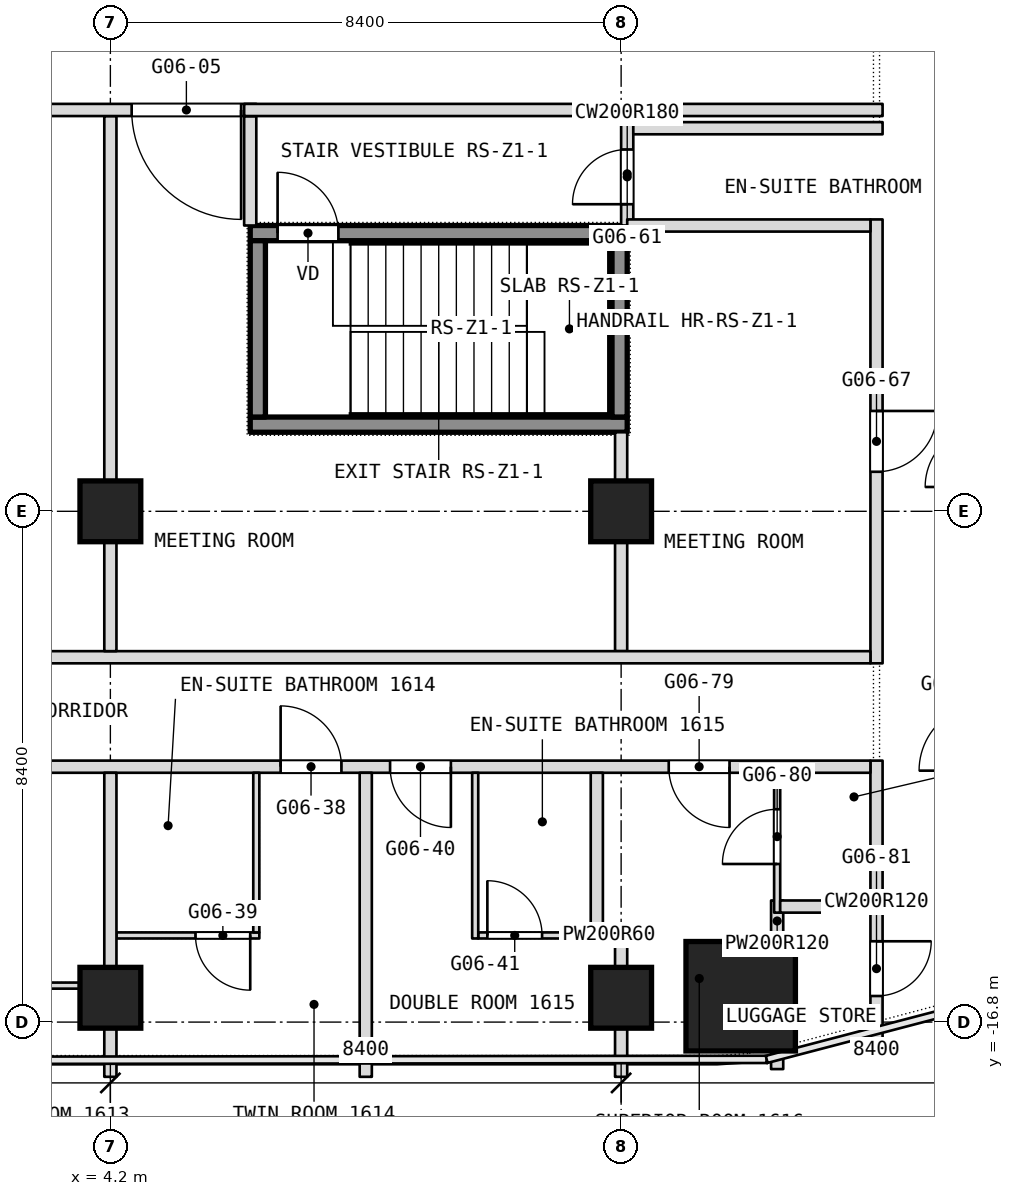
"""IFC4 building model, lengths in metres.
Left out: names, types, materials, properties, quantities, classifications, styles, units other than length and angle.
Written with IfcOpenShell. Run it as: python <this file> out.ifc"""

import sys

from ifc_helpers import new_model, si_unit, direction, frame, frame_2d, origin, origin_2d, place, context, subcontext, project, spatial, rectangle, extrude, element, fill, save


model = new_model("IFC4")
c1 = context("Model", 3, precision=1e-05, world=origin(), true_north=direction((0.0, 1.0)))
c2 = subcontext(c1, "Body", "Model", "MODEL_VIEW")
j1 = project(units=[si_unit("LENGTHUNIT", "METRE"), si_unit("PLANEANGLEUNIT", "RADIAN")], contexts=[c1])
p1 = place(None, origin())
s1 = spatial("IfcSite", under=j1, at=p1, CompositionType="ELEMENT")
p2 = place(p1, origin())
s2 = spatial("IfcBuilding", under=s1, at=p2, CompositionType="ELEMENT")
p3 = place(p2, frame((0.0, 0.0, 72.5)))
s3 = spatial("IfcBuildingStorey", under=s2, at=p3, CompositionType="ELEMENT", Elevation=72.5)
p4 = place(p3, frame((14.566, -16.375, 0.0), z_axis=(0.0, 0.0, 1.0), x_axis=(1.0, 0.0, 0.0)))
e1 = element("IfcColumn", 1, at=p4, inside=s3, PredefinedType="COLUMN", context=c2, shape_type="SweptSolid", body=[
    extrude(rectangle(XDim=1.8, YDim=1.8, at=origin_2d()), origin(), (0.0, 0.0, 1.0), 3.6),
])
for number, where, z_axis, x_axis in (
    (2, (4.2, -8.4, 0.0), (0.0, 0.0, 1.0), (1.0, 0.0, 0.0)),
    (3, (12.6, -8.4, 0.0), (0.0, 0.0, 1.0), (1.0, 0.0, 0.0)),
    (4, (12.6, -16.4, 0.0), (0.0, 0.0, 1.0), (1.0, 0.0, 0.0)),
    (5, (4.2, -16.4, 0.0), (0.0, 0.0, 1.0), (1.0, 0.0, 0.0)),
):
    element("IfcColumn", number, at=place(p3, frame(where, z_axis=z_axis, x_axis=x_axis)), inside=s3, PredefinedType="COLUMN", context=c2, shape_type="SweptSolid", body=[
        extrude(rectangle(XDim=1.0, YDim=1.0, at=origin_2d()), origin(), (0.0, 0.0, 1.0), 3.6),
    ])
p5 = place(p3, frame((16.8, -17.143, 0.0), z_axis=(0.0, 0.0, 1.0), x_axis=(0.0, 1.0, 0.0)))
e6 = element("IfcWall", 6, at=p5, inside=s3, PredefinedType="PARTITIONING", context=c2, shape_type="SweptSolid", body=[
    extrude(rectangle(XDim=4.643, YDim=0.2, at=frame_2d((2.322, 0.0))), origin(), (0.0, 0.0, 1.0), 3.34),
])
p6 = place(p5, frame((0.772, 0.0, 0.0)))
e7 = element("IfcOpeningElement", 7, at=p6, cuts=e6, PredefinedType="OPENING", context=c2, shape_type="SweptSolid", body=[
    extrude(rectangle(XDim=0.9, YDim=2.1, at=frame_2d((0.45, 1.05))), frame((0.0, 0.1, 0.0), z_axis=(0.0, -1.0, 0.0), x_axis=(1.0, 0.0, 0.0)), (0.0, 0.0, 1.0), 0.2),
])
p7 = place(p3, frame((16.8, -10.9, 0.0), z_axis=(0.0, 0.0, 1.0), x_axis=(0.0, 1.0, 0.0)))
e8 = element("IfcWall", 8, at=p7, inside=s3, PredefinedType="PARTITIONING", context=c2, shape_type="SweptSolid", body=[
    extrude(rectangle(XDim=7.3, YDim=0.2, at=frame_2d((3.65, 0.0))), origin(), (0.0, 0.0, 1.0), 3.34),
])
p8 = place(p7, frame((3.15, 0.0, 0.0)))
e9 = element("IfcOpeningElement", 9, at=p8, cuts=e8, PredefinedType="OPENING", context=c2, shape_type="SweptSolid", body=[
    extrude(rectangle(XDim=1.0, YDim=2.1, at=frame_2d((0.5, 1.05))), frame((0.0, 0.1, 0.0), z_axis=(0.0, -1.0, 0.0), x_axis=(1.0, 0.0, 0.0)), (0.0, 0.0, 1.0), 0.2),
])
p9 = place(p3, frame((0.65, -16.2, 0.0), z_axis=(0.0, 0.0, 1.0), x_axis=(1.0, 0.0, 0.0)))
e10 = element("IfcWall", 10, at=p9, inside=s3, PredefinedType="PARTITIONING", context=c2, shape_type="SweptSolid", body=[
    extrude(rectangle(XDim=3.65, YDim=0.1, at=frame_2d((1.825, 0.0))), origin(), (0.0, 0.0, 1.0), 2.94),
])
p10 = place(p9, frame((0.15, 0.0, 0.0)))
e11 = element("IfcOpeningElement", 11, at=p10, cuts=e10, PredefinedType="OPENING", context=c2, shape_type="SweptSolid", body=[
    extrude(rectangle(XDim=0.9, YDim=2.1, at=frame_2d((0.45, 1.05))), frame((0.0, 0.05, 0.0), z_axis=(0.0, -1.0, 0.0), x_axis=(1.0, 0.0, 0.0)), (0.0, 0.0, 1.0), 0.1),
])
p11 = place(p3, frame((4.3, -15.375, 0.0), z_axis=(0.0, 0.0, 1.0), x_axis=(1.0, 0.0, 0.0)))
e12 = element("IfcWall", 12, at=p11, inside=s3, PredefinedType="PARTITIONING", context=c2, shape_type="SweptSolid", body=[
    extrude(rectangle(XDim=2.35, YDim=0.1, at=frame_2d((1.175, 0.0))), origin(), (0.0, 0.0, 1.0), 3.34),
])
p12 = place(p11, frame((1.3, 0.0, 0.0)))
e13 = element("IfcOpeningElement", 13, at=p12, cuts=e12, PredefinedType="OPENING", context=c2, shape_type="SweptSolid", body=[
    extrude(rectangle(XDim=0.9, YDim=2.1, at=frame_2d((0.45, 1.05))), frame((0.0, 0.05, 0.0), z_axis=(0.0, -1.0, 0.0), x_axis=(1.0, 0.0, 0.0)), (0.0, 0.0, 1.0), 0.1),
])
p13 = place(p3, frame((10.25, -15.375, 0.0), z_axis=(0.0, 0.0, 1.0), x_axis=(1.0, 0.0, 0.0)))
e14 = element("IfcWall", 14, at=p13, inside=s3, PredefinedType="PARTITIONING", context=c2, shape_type="SweptSolid", body=[
    extrude(rectangle(XDim=2.05, YDim=0.1, at=frame_2d((1.025, 0.0))), origin(), (0.0, 0.0, 1.0), 3.34),
])
p14 = place(p13, frame((0.15, 0.0, 0.0)))
e15 = element("IfcOpeningElement", 15, at=p14, cuts=e14, PredefinedType="OPENING", context=c2, shape_type="SweptSolid", body=[
    extrude(rectangle(XDim=0.9, YDim=2.1, at=frame_2d((0.45, 1.05))), frame((0.0, 0.05, 0.0), z_axis=(0.0, -1.0, 0.0), x_axis=(1.0, 0.0, 0.0)), (0.0, 0.0, 1.0), 0.1),
])
p15 = place(p3, frame((12.1, -15.375, 0.0), z_axis=(0.0, 0.0, 1.0), x_axis=(1.0, 0.0, 0.0)))
e16 = element("IfcWall", 16, at=p15, inside=s3, PredefinedType="PARTITIONING", context=c2, shape_type="SweptSolid", body=[
    extrude(rectangle(XDim=0.6, YDim=0.2, at=frame_2d((0.3, 0.0))), origin(), (0.0, 0.0, 1.0), 3.34),
])
p16 = place(p3, frame((15.166, -17.573, 0.0), z_axis=(0.0, 0.0, 1.0), x_axis=(0.0, 1.0, 0.0)))
e17 = element("IfcWall", 17, at=p16, inside=s3, PredefinedType="PARTITIONING", context=c2, shape_type="SweptSolid", body=[
    extrude(rectangle(XDim=0.298, YDim=0.2, at=frame_2d((0.149, 0.0))), origin(), (0.0, 0.0, 1.0), 3.34),
])
p17 = place(p3, frame((15.166, -15.475, 0.0), z_axis=(0.0, 0.0, 1.0), x_axis=(0.0, 1.0, 0.0)))
e18 = element("IfcWall", 18, at=p17, inside=s3, PredefinedType="PARTITIONING", context=c2, shape_type="SweptSolid", body=[
    extrude(rectangle(XDim=0.675, YDim=0.2, at=frame_2d((0.337, 0.0))), origin(), (0.0, 0.0, 1.0), 3.34),
])
p18 = place(p3, frame((15.166, -15.0, 0.0), z_axis=(0.0, 0.0, 1.0), x_axis=(0.0, 1.0, 0.0)))
e19 = element("IfcWall", 19, at=p18, inside=s3, PredefinedType="PARTITIONING", context=c2, shape_type="SweptSolid", body=[
    extrude(rectangle(XDim=2.3, YDim=0.1, at=frame_2d((1.15, 0.0))), origin(), (0.0, 0.0, 1.0), 3.34),
])
p19 = place(p18, frame((0.8, 0.0, 0.0)))
e20 = element("IfcOpeningElement", 20, at=p19, cuts=e19, PredefinedType="OPENING", context=c2, shape_type="SweptSolid", body=[
    extrude(rectangle(XDim=0.9, YDim=2.1, at=frame_2d((0.45, 1.05))), frame((0.0, 0.05, 0.0), z_axis=(0.0, -1.0, 0.0), x_axis=(1.0, 0.0, 0.0)), (0.0, 0.0, 1.0), 0.1),
])
p20 = place(p3, frame((15.216, -14.9, 0.0), z_axis=(0.0, 0.0, 1.0), x_axis=(1.0, 0.0, 0.0)))
e21 = element("IfcWall", 21, at=p20, inside=s3, PredefinedType="PARTITIONING", context=c2, shape_type="SweptSolid", body=[
    extrude(rectangle(XDim=1.484, YDim=0.2, at=frame_2d((0.742, 0.0))), origin(), (0.0, 0.0, 1.0), 3.34),
])
p21 = place(p3, frame((12.7, -3.7, 0.0), z_axis=(0.0, 0.0, 1.0), x_axis=(0.0, 1.0, 0.0)))
e22 = element("IfcWall", 22, at=p21, inside=s3, PredefinedType="PARTITIONING", context=c2, shape_type="SweptSolid", body=[
    extrude(rectangle(XDim=1.7, YDim=0.2, at=frame_2d((0.85, 0.0))), origin(), (0.0, 0.0, 1.0), 3.34),
])
p22 = place(p21, frame((0.35, 0.0, 0.0)))
e23 = element("IfcOpeningElement", 23, at=p22, cuts=e22, PredefinedType="OPENING", context=c2, shape_type="SweptSolid", body=[
    extrude(rectangle(XDim=0.9, YDim=2.1, at=frame_2d((0.45, 1.05))), frame((0.0, 0.1, 0.0), z_axis=(0.0, -1.0, 0.0), x_axis=(1.0, 0.0, 0.0)), (0.0, 0.0, 1.0), 0.2),
])
p23 = place(p3, frame((12.6, -17.7, 0.0), z_axis=(0.0, 0.0, 1.0), x_axis=(0.0, 1.0, 0.0)))
e24 = element("IfcWall", 24, at=p23, inside=s3, PredefinedType="PARTITIONING", context=c2, shape_type="SweptSolid", body=[
    extrude(rectangle(XDim=2.225, YDim=0.2, at=frame_2d((1.112, 0.0))), origin(), (0.0, 0.0, 1.0), 3.34),
])
p24 = place(p3, frame((12.6, -10.7, 0.0), z_axis=(0.0, 0.0, 1.0), x_axis=(0.0, 1.0, 0.0)))
e25 = element("IfcWall", 25, at=p24, inside=s3, PredefinedType="PARTITIONING", context=c2, shape_type="SweptSolid", body=[
    extrude(rectangle(XDim=3.6, YDim=0.2, at=frame_2d((1.8, 0.0))), origin(), (0.0, 0.0, 1.0), 3.34),
])
p25 = place(p3, frame((-16.7, -12.6, 0.0), z_axis=(0.0, 0.0, 1.0), x_axis=(1.0, 0.0, 0.0)))
e26 = element("IfcWall", 26, at=p25, inside=s3, PredefinedType="PARTITIONING", context=c2, shape_type="SweptSolid", body=[
    extrude(rectangle(XDim=33.4, YDim=0.2, at=frame_2d((16.7, 0.0))), origin(), (0.0, 0.0, 1.0), 3.34),
])
p26 = place(p25, frame((7.8, 0.0, 0.0)))
e27 = element("IfcOpeningElement", 27, at=p26, cuts=e26, PredefinedType="OPENING", context=c2, shape_type="SweptSolid", body=[
    extrude(rectangle(XDim=1.1, YDim=2.1, at=frame_2d((0.55, 1.05))), frame((0.0, 0.1, 0.0), z_axis=(0.0, -1.0, 0.0), x_axis=(1.0, 0.0, 0.0)), (0.0, 0.0, 1.0), 0.2),
])
p27 = place(p25, frame((16.1, 0.0, 0.0)))
e28 = element("IfcOpeningElement", 28, at=p27, cuts=e26, PredefinedType="OPENING", context=c2, shape_type="SweptSolid", body=[
    extrude(rectangle(XDim=1.1, YDim=2.1, at=frame_2d((0.55, 1.05))), frame((0.0, 0.1, 0.0), z_axis=(0.0, -1.0, 0.0), x_axis=(1.0, 0.0, 0.0)), (0.0, 0.0, 1.0), 0.2),
])
p28 = place(p25, frame((23.7, 0.0, 0.0)))
e29 = element("IfcOpeningElement", 29, at=p28, cuts=e26, PredefinedType="OPENING", context=c2, shape_type="SweptSolid", body=[
    extrude(rectangle(XDim=1.0, YDim=2.1, at=frame_2d((0.5, 1.05))), frame((0.0, 0.1, 0.0), z_axis=(0.0, -1.0, 0.0), x_axis=(1.0, 0.0, 0.0)), (0.0, 0.0, 1.0), 0.2),
])
p29 = place(p25, frame((25.5, 0.0, 0.0)))
e30 = element("IfcOpeningElement", 30, at=p29, cuts=e26, PredefinedType="OPENING", context=c2, shape_type="SweptSolid", body=[
    extrude(rectangle(XDim=1.0, YDim=2.1, at=frame_2d((0.5, 1.05))), frame((0.0, 0.1, 0.0), z_axis=(0.0, -1.0, 0.0), x_axis=(1.0, 0.0, 0.0)), (0.0, 0.0, 1.0), 0.2),
])
p30 = place(p25, frame((2.367, 0.0, 0.0)))
e31 = element("IfcOpeningElement", 31, at=p30, cuts=e26, PredefinedType="OPENING", context=c2, shape_type="SweptSolid", body=[
    extrude(rectangle(XDim=1.0, YDim=2.1, at=frame_2d((0.5, 1.05))), frame((0.0, 0.1, 0.0), z_axis=(0.0, -1.0, 0.0), x_axis=(1.0, 0.0, 0.0)), (0.0, 0.0, 1.0), 0.2),
])
p31 = place(p25, frame((30.083, 0.0, 0.0)))
e32 = element("IfcOpeningElement", 32, at=p31, cuts=e26, PredefinedType="OPENING", context=c2, shape_type="SweptSolid", body=[
    extrude(rectangle(XDim=1.0, YDim=2.1, at=frame_2d((0.5, 1.05))), frame((0.0, 0.1, 0.0), z_axis=(0.0, -1.0, 0.0), x_axis=(1.0, 0.0, 0.0)), (0.0, 0.0, 1.0), 0.2),
])
p32 = place(p3, frame((12.2, -15.325, 0.0), z_axis=(0.0, 0.0, 1.0), x_axis=(0.0, 1.0, 0.0)))
e33 = element("IfcWall", 33, at=p32, inside=s3, PredefinedType="PARTITIONING", context=c2, shape_type="SweptSolid", body=[
    extrude(rectangle(XDim=2.625, YDim=0.2, at=frame_2d((1.312, 0.0))), origin(), (0.0, 0.0, 1.0), 3.34),
])
p33 = place(p3, frame((-4.1, -10.8, 0.0), z_axis=(0.0, 0.0, 1.0), x_axis=(1.0, 0.0, 0.0)))
e34 = element("IfcWall", 34, at=p33, inside=s3, PredefinedType="PARTITIONING", context=c2, shape_type="SweptSolid", body=[
    extrude(rectangle(XDim=20.8, YDim=0.2, at=frame_2d((10.4, 0.0))), origin(), (0.0, 0.0, 1.0), 3.34),
])
p34 = place(p3, frame((10.2, -15.425, 0.0), z_axis=(0.0, 0.0, 1.0), x_axis=(0.0, 1.0, 0.0)))
e35 = element("IfcWall", 35, at=p34, inside=s3, PredefinedType="PARTITIONING", context=c2, shape_type="SweptSolid", body=[
    extrude(rectangle(XDim=2.725, YDim=0.1, at=frame_2d((1.363, 0.0))), origin(), (0.0, 0.0, 1.0), 3.34),
])
p35 = place(p3, frame((8.4, -17.7, 0.0), z_axis=(0.0, 0.0, 1.0), x_axis=(0.0, 1.0, 0.0)))
e36 = element("IfcWall", 36, at=p35, inside=s3, PredefinedType="PARTITIONING", context=c2, shape_type="SweptSolid", body=[
    extrude(rectangle(XDim=5.0, YDim=0.2, at=frame_2d((2.5, 0.0))), origin(), (0.0, 0.0, 1.0), 3.34),
])
p36 = place(p3, frame((6.6, -15.325, 0.0), z_axis=(0.0, 0.0, 1.0), x_axis=(0.0, 1.0, 0.0)))
e37 = element("IfcWall", 37, at=p36, inside=s3, PredefinedType="PARTITIONING", context=c2, shape_type="SweptSolid", body=[
    extrude(rectangle(XDim=2.625, YDim=0.1, at=frame_2d((1.312, 0.0))), origin(), (0.0, 0.0, 1.0), 3.34),
])
p37 = place(p3, frame((6.5, -3.7, 0.0), z_axis=(0.0, 0.0, 1.0), x_axis=(0.0, 1.0, 0.0)))
e38 = element("IfcWall", 38, at=p37, inside=s3, PredefinedType="PARTITIONING", context=c2, shape_type="SweptSolid", body=[
    extrude(rectangle(XDim=1.8, YDim=0.2, at=frame_2d((0.9, 0.0))), origin(), (0.0, 0.0, 1.0), 3.34),
])
p38 = place(p3, frame((4.2, -17.7, 0.0), z_axis=(0.0, 0.0, 1.0), x_axis=(0.0, 1.0, 0.0)))
e39 = element("IfcWall", 39, at=p38, inside=s3, PredefinedType="PARTITIONING", context=c2, shape_type="SweptSolid", body=[
    extrude(rectangle(XDim=5.0, YDim=0.2, at=frame_2d((2.5, 0.0))), origin(), (0.0, 0.0, 1.0), 3.34),
])
p39 = place(p3, frame((4.2, -10.7, 0.0), z_axis=(0.0, 0.0, 1.0), x_axis=(0.0, 1.0, 0.0)))
e40 = element("IfcWall", 40, at=p39, inside=s3, PredefinedType="PARTITIONING", context=c2, shape_type="SweptSolid", body=[
    extrude(rectangle(XDim=8.8, YDim=0.2, at=frame_2d((4.4, 0.0))), origin(), (0.0, 0.0, 1.0), 3.34),
])
p40 = place(p3, frame((12.7, -3.7, 0.0), z_axis=(0.0, 0.0, 1.0), x_axis=(1.0, 0.0, 0.0)))
e41 = element("IfcWall", 41, at=p40, inside=s3, PredefinedType="PARTITIONING", context=c2, shape_type="SweptSolid", body=[
    extrude(rectangle(XDim=4.0, YDim=0.2, at=frame_2d((2.0, 0.0))), origin(), (0.0, 0.0, 1.0), 3.34),
])
p41 = place(p3, frame((12.8, -2.1, 0.0), z_axis=(0.0, 0.0, 1.0), x_axis=(1.0, 0.0, 0.0)))
e42 = element("IfcWall", 42, at=p41, inside=s3, PredefinedType="PARTITIONING", context=c2, shape_type="SweptSolid", body=[
    extrude(rectangle(XDim=4.1, YDim=0.2, at=frame_2d((2.05, 0.0))), origin(), (0.0, 0.0, 1.0), 3.34),
])
p42 = place(p3, frame((-4.3, -1.8, 0.0), z_axis=(0.0, 0.0, 1.0), x_axis=(1.0, 0.0, 0.0)))
e43 = element("IfcWall", 43, at=p42, inside=s3, PredefinedType="PARTITIONING", context=c2, shape_type="SweptSolid", body=[
    extrude(rectangle(XDim=10.9, YDim=0.2, at=frame_2d((5.45, 0.0))), origin(), (0.0, 0.0, 1.0), 3.34),
])
p43 = place(p42, frame((3.4, 0.0, 0.0)))
e44 = element("IfcOpeningElement", 44, at=p43, cuts=e43, PredefinedType="OPENING", context=c2, shape_type="SweptSolid", body=[
    extrude(rectangle(XDim=1.8, YDim=2.1, at=frame_2d((0.9, 1.05))), frame((0.0, 0.1, 0.0), z_axis=(0.0, -1.0, 0.0), x_axis=(1.0, 0.0, 0.0)), (0.0, 0.0, 1.0), 0.2),
])
p44 = place(p42, frame((8.85, 0.0, 0.0)))
e45 = element("IfcOpeningElement", 45, at=p44, cuts=e43, PredefinedType="OPENING", context=c2, shape_type="SweptSolid", body=[
    extrude(rectangle(XDim=1.8, YDim=2.1, at=frame_2d((0.9, 1.05))), frame((0.0, 0.1, 0.0), z_axis=(0.0, -1.0, 0.0), x_axis=(1.0, 0.0, 0.0)), (0.0, 0.0, 1.0), 0.2),
])
p45 = place(p3, frame((6.4, -1.8, 0.0), z_axis=(0.0, 0.0, 1.0), x_axis=(1.0, 0.0, 0.0)))
e46 = element("IfcWall", 46, at=p45, inside=s3, PredefinedType="PARTITIONING", context=c2, shape_type="SweptSolid", body=[
    extrude(rectangle(XDim=10.5, YDim=0.2, at=frame_2d((5.25, 0.0))), origin(), (0.0, 0.0, 1.0), 3.34),
])
p46 = place(p3, frame((6.5, -6.975, 0.1), z_axis=(0.0, 0.0, 1.0), x_axis=(1.0, 0.0, 0.0)))
e47 = element("IfcWall", 47, at=p46, inside=s3, PredefinedType="SHEAR", context=c2, shape_type="SweptSolid", body=[
    extrude(rectangle(XDim=6.2, YDim=0.25, at=frame_2d((3.1, 0.0))), origin(), (0.0, 0.0, 1.0), 3.6),
])
p47 = place(p3, frame((6.5, -3.825, 0.1), z_axis=(0.0, 0.0, 1.0), x_axis=(1.0, 0.0, 0.0)))
e48 = element("IfcWall", 48, at=p47, inside=s3, PredefinedType="SHEAR", context=c2, shape_type="SweptSolid", body=[
    extrude(rectangle(XDim=6.2, YDim=0.25, at=frame_2d((3.1, 0.0))), origin(), (0.0, 0.0, 1.0), 3.6),
])
p48 = place(p47, frame((0.45, 0.0, 0.0)))
e49 = element("IfcOpeningElement", 49, at=p48, cuts=e48, PredefinedType="OPENING", context=c2, shape_type="SweptSolid", body=[
    extrude(rectangle(XDim=1.0, YDim=2.1, at=frame_2d((0.5, 1.05))), frame((0.0, 0.125, 0.0), z_axis=(0.0, -1.0, 0.0), x_axis=(1.0, 0.0, 0.0)), (0.0, 0.0, 1.0), 0.25),
])
for number, where, z_axis, x_axis in (
    (50, (6.625, -6.85, 0.1), (0.0, 0.0, 1.0), (0.0, 1.0, 0.0)),
    (51, (12.575, -6.85, 0.1), (0.0, 0.0, 1.0), (0.0, 1.0, 0.0)),
):
    element("IfcWall", number, at=place(p3, frame(where, z_axis=z_axis, x_axis=x_axis)), inside=s3, PredefinedType="SHEAR", context=c2, shape_type="SweptSolid", body=[
        extrude(rectangle(XDim=2.9, YDim=0.25, at=frame_2d((1.45, 0.0))), origin(), (0.0, 0.0, 1.0), 3.6),
    ])
p49 = place(p6, origin())
e52 = element("IfcDoor", 52, at=p49, inside=s3, OperationType="SINGLE_SWING_RIGHT", PredefinedType="DOOR", context=c2, shape_type="SweptSolid", body=[
    extrude(rectangle(XDim=0.9, YDim=2.1, at=frame_2d((0.45, 1.05))), frame((0.0, 0.025, 0.0), z_axis=(0.0, -1.0, 0.0), x_axis=(1.0, 0.0, 0.0)), (0.0, 0.0, 1.0), 0.05),
])
fill(e7, e52)
p50 = place(p8, origin())
e53 = element("IfcDoor", 53, at=p50, inside=s3, OperationType="SINGLE_SWING_LEFT", PredefinedType="DOOR", context=c2, shape_type="SweptSolid", body=[
    extrude(rectangle(XDim=1.0, YDim=2.1, at=frame_2d((0.5, 1.05))), frame((0.0, 0.025, 0.0), z_axis=(0.0, -1.0, 0.0), x_axis=(1.0, 0.0, 0.0)), (0.0, 0.0, 1.0), 0.05),
])
fill(e9, e53)
p51 = place(p12, origin())
e54 = element("IfcDoor", 54, at=p51, inside=s3, OperationType="SINGLE_SWING_RIGHT", PredefinedType="DOOR", context=c2, shape_type="SweptSolid", body=[
    extrude(rectangle(XDim=0.9, YDim=2.1, at=frame_2d((0.45, 1.05))), frame((0.0, 0.025, 0.0), z_axis=(0.0, -1.0, 0.0), x_axis=(1.0, 0.0, 0.0)), (0.0, 0.0, 1.0), 0.05),
])
fill(e13, e54)
p52 = place(p14, origin())
e55 = element("IfcDoor", 55, at=p52, inside=s3, OperationType="SINGLE_SWING_LEFT", PredefinedType="DOOR", context=c2, shape_type="SweptSolid", body=[
    extrude(rectangle(XDim=0.9, YDim=2.1, at=frame_2d((0.45, 1.05))), frame((0.0, 0.025, 0.0), z_axis=(0.0, -1.0, 0.0), x_axis=(1.0, 0.0, 0.0)), (0.0, 0.0, 1.0), 0.05),
])
fill(e15, e55)
p53 = place(p19, origin())
e56 = element("IfcDoor", 56, at=p53, inside=s3, OperationType="SINGLE_SWING_RIGHT", PredefinedType="DOOR", context=c2, shape_type="SweptSolid", body=[
    extrude(rectangle(XDim=0.9, YDim=2.1, at=frame_2d((0.45, 1.05))), frame((0.0, 0.025, 0.0), z_axis=(0.0, -1.0, 0.0), x_axis=(1.0, 0.0, 0.0)), (0.0, 0.0, 1.0), 0.05),
])
fill(e20, e56)
p54 = place(p22, origin())
e57 = element("IfcDoor", 57, at=p54, inside=s3, OperationType="SINGLE_SWING_RIGHT", PredefinedType="DOOR", context=c2, shape_type="SweptSolid", body=[
    extrude(rectangle(XDim=0.9, YDim=2.1, at=frame_2d((0.45, 1.05))), frame((0.0, 0.025, 0.0), z_axis=(0.0, -1.0, 0.0), x_axis=(1.0, 0.0, 0.0)), (0.0, 0.0, 1.0), 0.05),
])
fill(e23, e57)
p55 = place(p28, origin())
e58 = element("IfcDoor", 58, at=p55, inside=s3, OperationType="SINGLE_SWING_RIGHT", PredefinedType="DOOR", context=c2, shape_type="SweptSolid", body=[
    extrude(rectangle(XDim=1.0, YDim=2.1, at=frame_2d((0.5, 1.05))), frame((0.0, 0.025, 0.0), z_axis=(0.0, -1.0, 0.0), x_axis=(1.0, 0.0, 0.0)), (0.0, 0.0, 1.0), 0.05),
])
fill(e29, e58)
p56 = place(p29, origin())
e59 = element("IfcDoor", 59, at=p56, inside=s3, OperationType="SINGLE_SWING_RIGHT", PredefinedType="DOOR", context=c2, shape_type="SweptSolid", body=[
    extrude(rectangle(XDim=1.0, YDim=2.1, at=frame_2d((0.5, 1.05))), frame((0.0, 0.025, 0.0), z_axis=(0.0, -1.0, 0.0), x_axis=(1.0, 0.0, 0.0)), (0.0, 0.0, 1.0), 0.05),
])
fill(e30, e59)
p57 = place(p31, origin())
e60 = element("IfcDoor", 60, at=p57, inside=s3, OperationType="SINGLE_SWING_LEFT", PredefinedType="DOOR", context=c2, shape_type="SweptSolid", body=[
    extrude(rectangle(XDim=1.0, YDim=2.1, at=frame_2d((0.5, 1.05))), frame((0.0, 0.025, 0.0), z_axis=(0.0, -1.0, 0.0), x_axis=(1.0, 0.0, 0.0)), (0.0, 0.0, 1.0), 0.05),
])
fill(e32, e60)
p58 = place(p44, origin())
e61 = element("IfcDoor", 61, at=p58, inside=s3, OperationType="DOUBLE_DOOR_SINGLE_SWING", PredefinedType="DOOR", context=c2, shape_type="SweptSolid", body=[
    extrude(rectangle(XDim=1.8, YDim=2.1, at=frame_2d((0.9, 1.05))), frame((0.0, 0.025, 0.0), z_axis=(0.0, -1.0, 0.0), x_axis=(1.0, 0.0, 0.0)), (0.0, 0.0, 1.0), 0.05),
])
fill(e45, e61)
p59 = place(p48, origin())
e62 = element("IfcDoor", 62, at=p59, inside=s3, OperationType="SINGLE_SWING_LEFT", PredefinedType="DOOR", context=c2, shape_type="SweptSolid", body=[
    extrude(rectangle(XDim=1.0, YDim=2.1, at=frame_2d((0.5, 1.05))), frame((0.0, 0.025, 0.0), z_axis=(0.0, -1.0, 0.0), x_axis=(1.0, 0.0, 0.0)), (0.0, 0.0, 1.0), 0.05),
])
fill(e49, e62)
save(model, sys.argv[1])
